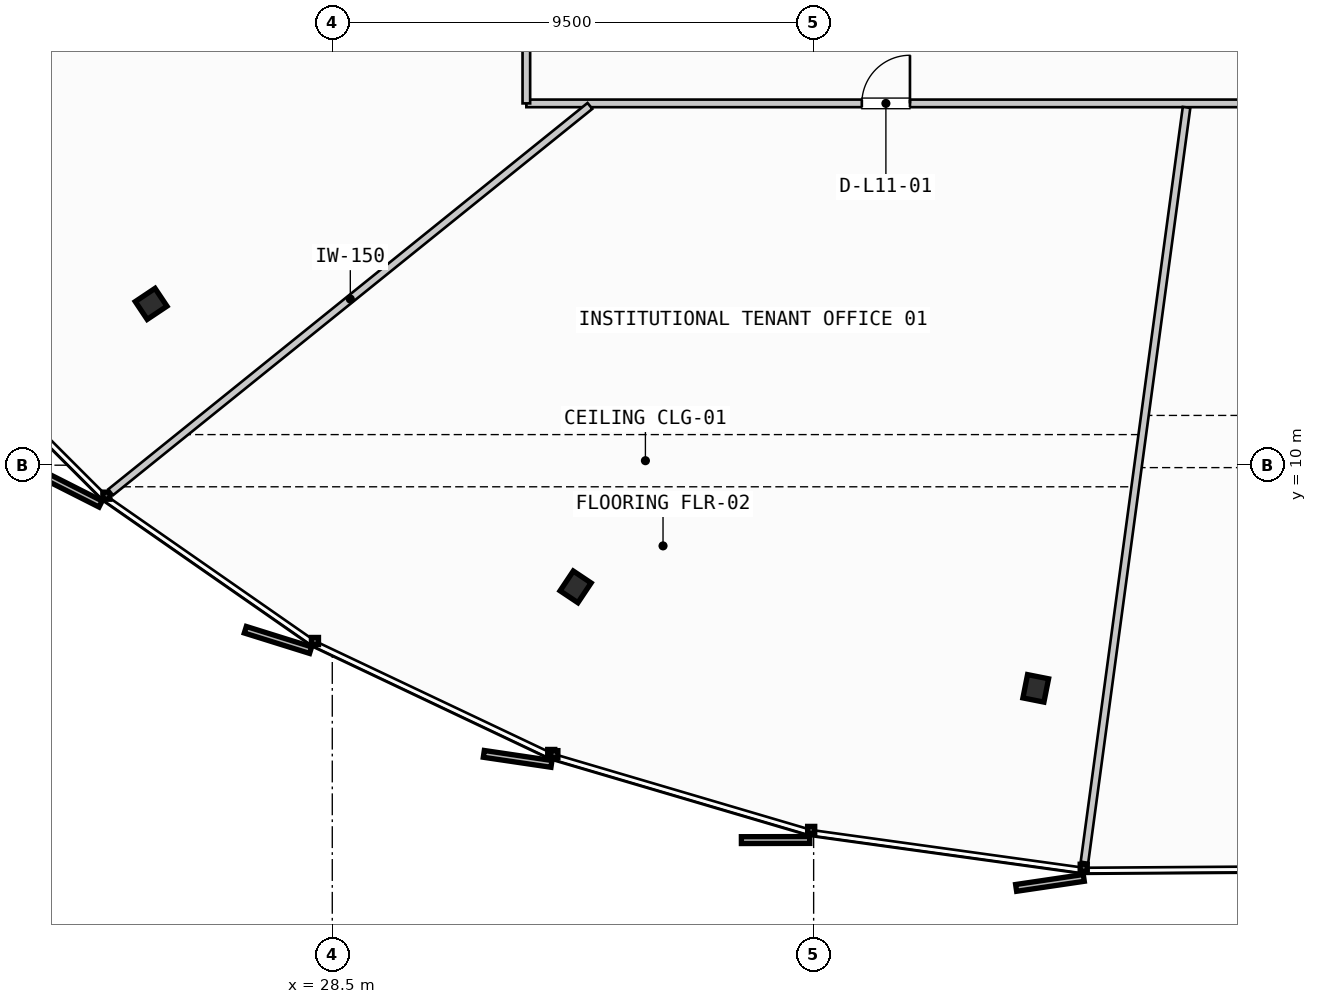
"""IFC4 building model, lengths in metres.
Left out: names, types, materials, properties, quantities, classifications, styles, units other than length and angle.
Written with IfcOpenShell. Run it as: python <this file> out.ifc"""

import sys

from ifc_helpers import new_model, si_unit, direction, frame, frame_2d, origin, origin_2d, place, context, subcontext, project, spatial, rectangle, i_section, extrude, source, transform, mapped, element, fill, save


model = new_model("IFC4")
c1 = context("Model", 3, precision=1e-05, world=origin(), true_north=direction((0.0, 1.0)))
c2 = subcontext(c1, "Body", "Model", "MODEL_VIEW")
j1 = project(units=[si_unit("LENGTHUNIT", "METRE"), si_unit("PLANEANGLEUNIT", "RADIAN")], contexts=[c1])
p1 = place(None, origin())
s1 = spatial("IfcSite", under=j1, at=p1, CompositionType="ELEMENT")
p2 = place(p1, origin())
s2 = spatial("IfcBuilding", under=s1, at=p2, CompositionType="ELEMENT")
p3 = place(p2, frame((0.0, 0.0, 48.6)))
s3 = spatial("IfcBuildingStorey", under=s2, at=p3, CompositionType="ELEMENT", Elevation=48.6)
m1 = source(origin(), c2, "Body", "SweptSolid", [
    extrude(i_section(OverallWidth=0.423, OverallDepth=0.469, WebThickness=0.051, FlangeThickness=0.081, FilletRadius=0.015, at=origin_2d()), origin(), (0.0, 0.0, 1.0), 3.55),
])
for number, where, z_axis, x_axis in (
    (1, (24.925, 13.183, 0.0), (0.0, 0.0, 1.0), (-0.831, -0.556, 0.0)),
    (2, (33.302, 7.599, 0.0), (0.0, 0.0, 1.0), (-0.556, -0.831, 0.0)),
    (3, (42.383, 5.596, 0.0), (0.0, 0.0, 1.0), (-0.195, -0.981, 0.0)),
):
    element("IfcColumn", number, at=place(p3, frame(where, z_axis=z_axis, x_axis=x_axis)), inside=s3, PredefinedType="COLUMN", context=c2, shape_type="MappedRepresentation", body=[
        mapped(m1, transform((0.0, 0.0, 0.0), scale=1.0)),
    ])
p4 = place(p3, frame((32.33, 17.14, 0.0), z_axis=(0.0, 0.0, 1.0), x_axis=(1.0, 0.0, 0.0)))
e4 = element("IfcWall", 4, at=p4, inside=s3, PredefinedType="PARTITIONING", context=c2, shape_type="SweptSolid", body=[
    extrude(rectangle(XDim=30.5, YDim=0.15, at=frame_2d((15.25, 0.0))), origin(), (0.0, 0.0, 1.0), 2.785),
])
p5 = place(p4, frame((6.621, 0.0, 0.0)))
e5 = element("IfcOpeningElement", 5, at=p5, cuts=e4, PredefinedType="OPENING", context=c2, shape_type="SweptSolid", body=[
    extrude(rectangle(XDim=0.95, YDim=2.15, at=frame_2d((0.475, 1.075))), frame((0.0, 0.085, 0.0), z_axis=(0.0, -1.0, 0.0), x_axis=(1.0, 0.0, 0.0)), (0.0, 0.0, 1.0), 0.17),
])
p6 = place(p4, frame((21.004, 0.0, 0.0)))
e6 = element("IfcOpeningElement", 6, at=p6, cuts=e4, PredefinedType="OPENING", context=c2, shape_type="SweptSolid", body=[
    extrude(rectangle(XDim=0.95, YDim=2.15, at=frame_2d((0.475, 1.075))), frame((0.0, 0.085, 0.0), z_axis=(0.0, -1.0, 0.0), x_axis=(1.0, 0.0, 0.0)), (0.0, 0.0, 1.0), 0.17),
])
p7 = place(p3, frame((32.33, 37.62, 0.0), z_axis=(0.0, 0.0, 1.0), x_axis=(0.0, -1.0, 0.0)))
e7 = element("IfcWall", 7, at=p7, inside=s3, PredefinedType="PARTITIONING", context=c2, shape_type="SweptSolid", body=[
    extrude(rectangle(XDim=20.48, YDim=0.15, at=frame_2d((10.24, 0.0))), origin(), (0.0, 0.0, 1.0), 2.785),
])
p8 = place(p7, frame((10.182, 0.0, 0.0)))
e8 = element("IfcOpeningElement", 8, at=p8, cuts=e7, PredefinedType="OPENING", context=c2, shape_type="SweptSolid", body=[
    extrude(rectangle(XDim=0.95, YDim=2.15, at=frame_2d((0.475, 1.075))), frame((0.0, 0.085, 0.0), z_axis=(0.0, -1.0, 0.0), x_axis=(1.0, 0.0, 0.0)), (0.0, 0.0, 1.0), 0.17),
])
p9 = place(p3, frame((33.585, 17.09, 0.0), z_axis=(0.0, 0.0, 1.0), x_axis=(-0.778592960222, -0.627529284012, 0.0)))
e9 = element("IfcWall", 9, at=p9, inside=s3, PredefinedType="PARTITIONING", context=c2, shape_type="SweptSolid", body=[
    extrude(rectangle(XDim=12.147, YDim=0.15, at=frame_2d((6.073, 0.0))), origin(), (0.0, 0.0, 1.0), 2.785),
])
p10 = place(p3, frame((45.36, 17.061, 0.0), z_axis=(0.0, 0.0, 1.0), x_axis=(-0.134025236221, -0.990977919056, 0.0)))
e10 = element("IfcWall", 10, at=p10, inside=s3, PredefinedType="PARTITIONING", context=c2, shape_type="SweptSolid", body=[
    extrude(rectangle(XDim=15.032, YDim=0.15, at=frame_2d((7.516, 0.0))), origin(), (0.0, 0.0, 1.0), 2.785),
])
m2 = source(origin(), c2, "Body", "SweptSolid", [
    extrude(rectangle(XDim=0.95, YDim=2.15, at=frame_2d((0.475, 1.075))), frame((0.0, 0.025, 0.0), z_axis=(0.0, -1.0, 0.0), x_axis=(1.0, 0.0, 0.0)), (0.0, 0.0, 1.0), 0.05),
])
p11 = place(p5, origin())
e11 = element("IfcDoor", 11, at=p11, inside=s3, OperationType="SINGLE_SWING_RIGHT", PredefinedType="DOOR", context=c2, shape_type="MappedRepresentation", body=[
    mapped(m2, transform((0.0, 0.0, 0.0), scale=1.0)),
])
fill(e5, e11)
save(model, sys.argv[1])
